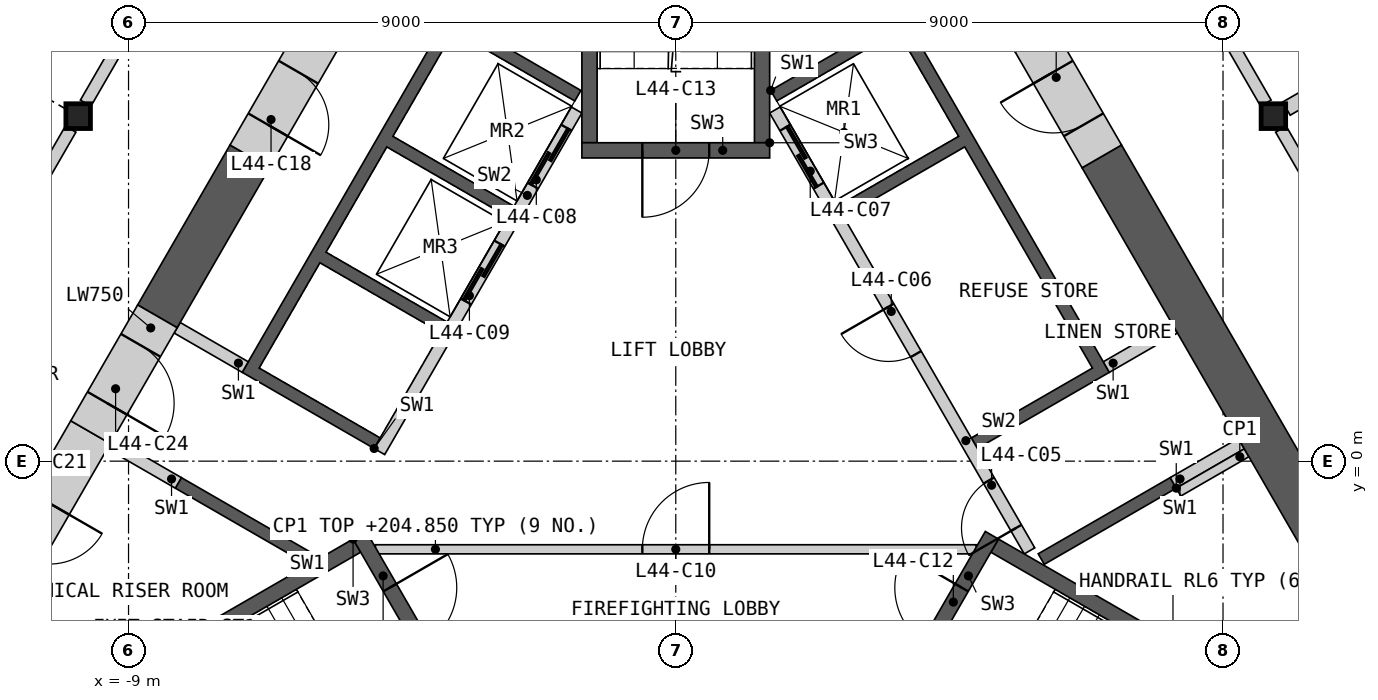
"""IFC4 building model, lengths in metres.
Left out: names, types, materials, properties, quantities, classifications, styles, units other than length and angle.
Written with IfcOpenShell. Run it as: python <this file> out.ifc"""

import sys

from ifc_helpers import new_model, si_unit, direction, frame, frame_2d, origin, origin_2d, place, context, subcontext, project, spatial, polyline, rectangle, i_section, outline, extrude, element, fill, save


model = new_model("IFC4")
c1 = context("Model", 3, precision=1e-05, world=origin(), true_north=direction((0.0, 1.0)))
c2 = subcontext(c1, "Body", "Model", "MODEL_VIEW")
j1 = project(units=[si_unit("LENGTHUNIT", "METRE"), si_unit("PLANEANGLEUNIT", "RADIAN")], contexts=[c1])
p1 = place(None, origin())
s1 = spatial("IfcSite", under=j1, at=p1, CompositionType="ELEMENT")
p2 = place(p1, origin())
s2 = spatial("IfcBuilding", under=s1, at=p2, CompositionType="ELEMENT")
p3 = place(p2, frame((0.0, 0.0, 201.6)))
s3 = spatial("IfcBuildingStorey", under=s2, at=p3, CompositionType="ELEMENT", Elevation=201.6)
for number, where, z_axis, x_axis in (
    (1, (-9.828, 5.675, 0.0), (0.0, 0.0, 1.0), (1.0, 0.0, 0.0)),
    (2, (9.828, 5.675, 0.0), (0.0, 0.0, 1.0), (1.0, 0.0, 0.0)),
):
    element("IfcColumn", number, at=place(p3, frame(where, z_axis=z_axis, x_axis=x_axis)), inside=s3, PredefinedType="COLUMN", context=c2, shape_type="SweptSolid", body=[
        extrude(i_section(OverallWidth=0.404, OverallDepth=0.407, WebThickness=0.027, FlangeThickness=0.044, at=origin_2d()), origin(), (0.0, 0.0, 1.0), 3.6),
    ])
p4 = place(p3, origin())
e3 = element("IfcWall", 3, at=p4, inside=s3, PredefinedType="SHEAR", context=c2, shape_type="SweptSolid", body=[
    extrude(outline(polyline([(1.561, 6.097), (3.731, 7.35), (7.131, 1.461), (4.96, 0.208), (4.861, 0.381), (6.852, 1.531), (4.752, 5.169), (2.76, 4.019), (2.66, 4.192), (4.652, 5.342), (3.652, 7.074), (1.66, 5.924), (1.561, 6.097)])), origin(), (0.0, 0.0, 1.0), 3.25),
])
p5 = place(p3, origin())
e4 = element("IfcWall", 4, at=p5, inside=s3, PredefinedType="SHEAR", context=c2, shape_type="SweptSolid", body=[
    extrude(outline(polyline([(8.231, -0.444), (6.061, -1.697), (5.96, -1.524), (8.131, -0.271), (8.231, -0.444)])), origin(), (0.0, 0.0, 1.0), 3.25),
])
p6 = place(p3, frame((5.817, -1.476, 0.0), z_axis=(0.0, 0.0, 1.0), x_axis=(-0.500002616675, 0.866023893041, 0.0)))
e5 = element("IfcWall", 5, at=p6, inside=s3, PredefinedType="SOLIDWALL", context=c2, shape_type="SweptSolid", body=[
    extrude(rectangle(XDim=8.373, YDim=0.2, at=frame_2d((4.187, 0.0))), origin(), (0.0, 0.0, 1.0), 3.25),
])
p7 = place(p6, frame((0.437, 0.0, 0.0)))
e6 = element("IfcOpeningElement", 6, at=p7, cuts=e5, PredefinedType="OPENING", context=c2, shape_type="SweptSolid", body=[
    extrude(rectangle(XDim=0.9, YDim=2.1, at=frame_2d((0.45, 1.05))), frame((0.0, 0.11, 0.0), z_axis=(0.0, -1.0, 0.0), x_axis=(1.0, 0.0, 0.0)), (0.0, 0.0, 1.0), 0.22),
])
p8 = place(p6, frame((3.737, 0.0, 0.0)))
e7 = element("IfcOpeningElement", 7, at=p8, cuts=e5, PredefinedType="OPENING", context=c2, shape_type="SweptSolid", body=[
    extrude(rectangle(XDim=0.9, YDim=2.1, at=frame_2d((0.45, 1.05))), frame((0.0, 0.11, 0.0), z_axis=(0.0, -1.0, 0.0), x_axis=(1.0, 0.0, 0.0)), (0.0, 0.0, 1.0), 0.22),
])
p9 = place(p6, frame((6.937, 0.0, 0.0)))
e8 = element("IfcOpeningElement", 8, at=p9, cuts=e5, PredefinedType="OPENING", context=c2, shape_type="SweptSolid", body=[
    extrude(rectangle(XDim=1.1, YDim=2.1, at=frame_2d((0.55, 1.05))), frame((0.0, 0.11, 0.0), z_axis=(0.0, -1.0, 0.0), x_axis=(1.0, 0.0, 0.0)), (0.0, 0.0, 1.0), 0.22),
])
for number, where, z_axis, x_axis in (
    (9, (8.181, -0.357, 0.0), (0.0, 0.0, 1.0), (0.866, 0.5, 0.0)),
    (10, (7.081, 1.548, 0.0), (0.0, 0.0, 1.0), (0.866, 0.5, 0.0)),
):
    element("IfcWall", number, at=place(p3, frame(where, z_axis=z_axis, x_axis=x_axis)), inside=s3, PredefinedType="SHEAR", context=c2, shape_type="SweptSolid", body=[
        extrude(rectangle(XDim=1.293, YDim=0.2, at=frame_2d((0.646, 0.0))), origin(), (0.0, 0.0, 1.0), 3.25),
    ])
p10 = place(p3, origin())
e11 = element("IfcWall", 11, at=p10, inside=s3, PredefinedType="SHEAR", context=c2, shape_type="SweptSolid", body=[
    extrude(outline(polyline([(-6.061, -1.697), (-8.231, -0.444), (-8.131, -0.271), (-5.96, -1.524), (-6.061, -1.697)])), origin(), (0.0, 0.0, 1.0), 3.25),
])
p11 = place(p3, origin())
e12 = element("IfcWall", 12, at=p11, inside=s3, PredefinedType="SHEAR", context=c2, shape_type="SweptSolid", body=[
    extrude(outline(polyline([(-4.96, 0.208), (-7.131, 1.461), (-3.731, 7.35), (-1.561, 6.097), (-1.66, 5.924), (-3.652, 7.074), (-4.652, 5.342), (-2.66, 4.192), (-2.76, 4.019), (-4.752, 5.169), (-5.752, 3.437), (-3.76, 2.287), (-3.861, 2.113), (-5.852, 3.263), (-6.852, 1.531), (-4.861, 0.381), (-4.96, 0.208)])), origin(), (0.0, 0.0, 1.0), 3.25),
])
p12 = place(p3, frame((-1.631, 5.776, 0.0), z_axis=(0.0, 0.0, 1.0), x_axis=(-0.499992876559, -0.866029516466, 0.0)))
e13 = element("IfcWall", 13, at=p12, inside=s3, PredefinedType="SOLIDWALL", context=c2, shape_type="SweptSolid", body=[
    extrude(rectangle(XDim=6.486, YDim=0.2, at=frame_2d((3.243, 0.0))), origin(), (0.0, 0.0, 1.0), 3.25),
])
p13 = place(p12, frame((0.337, 0.0, 0.0)))
e14 = element("IfcOpeningElement", 14, at=p13, cuts=e13, PredefinedType="OPENING", context=c2, shape_type="SweptSolid", body=[
    extrude(rectangle(XDim=1.1, YDim=2.1, at=frame_2d((0.55, 1.05))), frame((0.0, 0.11, 0.0), z_axis=(0.0, -1.0, 0.0), x_axis=(1.0, 0.0, 0.0)), (0.0, 0.0, 1.0), 0.22),
])
p14 = place(p12, frame((2.537, 0.0, 0.0)))
e15 = element("IfcOpeningElement", 15, at=p14, cuts=e13, PredefinedType="OPENING", context=c2, shape_type="SweptSolid", body=[
    extrude(rectangle(XDim=1.1, YDim=2.1, at=frame_2d((0.55, 1.05))), frame((0.0, 0.11, 0.0), z_axis=(0.0, -1.0, 0.0), x_axis=(1.0, 0.0, 0.0)), (0.0, 0.0, 1.0), 0.22),
])
for number, where, z_axis, x_axis in (
    (16, (-7.081, 1.548, 0.0), (0.0, 0.0, 1.0), (-0.866, 0.5, 0.0)),
    (17, (-8.181, -0.357, 0.0), (0.0, 0.0, 1.0), (-0.866, 0.5, 0.0)),
):
    element("IfcWall", number, at=place(p3, frame(where, z_axis=z_axis, x_axis=x_axis)), inside=s3, PredefinedType="SHEAR", context=c2, shape_type="SweptSolid", body=[
        extrude(rectangle(XDim=1.293, YDim=0.2, at=frame_2d((0.646, 0.0))), origin(), (0.0, 0.0, 1.0), 3.25),
    ])
p15 = place(p3, frame((-4.941, -1.45, 0.0), z_axis=(0.0, 0.0, 1.0), x_axis=(1.0, 0.0, 0.0)))
e18 = element("IfcWall", 18, at=p15, inside=s3, PredefinedType="PARTITIONING", context=c2, shape_type="SweptSolid", body=[
    extrude(rectangle(XDim=9.882, YDim=0.15, at=frame_2d((4.941, 0.0))), origin(), (0.0, 0.0, 1.0), 3.25),
])
p16 = place(p15, frame((4.391, 0.0, 0.0)))
e19 = element("IfcOpeningElement", 19, at=p16, cuts=e18, PredefinedType="OPENING", context=c2, shape_type="SweptSolid", body=[
    extrude(rectangle(XDim=1.1, YDim=2.1, at=frame_2d((0.55, 1.05))), frame((0.0, 0.085, 0.0), z_axis=(0.0, -1.0, 0.0), x_axis=(1.0, 0.0, 0.0)), (0.0, 0.0, 1.0), 0.17),
])
p17 = place(p3, origin())
e20 = element("IfcWall", 20, at=p17, inside=s3, PredefinedType="SHEAR", context=c2, shape_type="SweptSolid", body=[
    extrude(outline(polyline([(-5.307, -1.281), (-10.374, -4.206), (-10.032, -4.298), (-5.182, -1.498), (-5.307, -1.281)])), origin(), (0.0, 0.0, 1.0), 3.25),
])
p18 = place(p3, frame((-5.199, -1.219, 0.0), z_axis=(0.0, 0.0, 1.0), x_axis=(0.499982516597, -0.866035497597, 0.0)))
e21 = element("IfcWall", 21, at=p18, inside=s3, PredefinedType="SHEAR", context=c2, shape_type="SweptSolid", body=[
    extrude(rectangle(XDim=3.088, YDim=0.25, at=frame_2d((1.544, 0.0))), origin(), (0.0, 0.0, 1.0), 3.25),
])
p19 = place(p18, frame((0.994, 0.0, 0.0)))
e22 = element("IfcOpeningElement", 22, at=p19, cuts=e21, PredefinedType="OPENING", context=c2, shape_type="SweptSolid", body=[
    extrude(rectangle(XDim=1.1, YDim=2.1, at=frame_2d((0.55, 1.05))), frame((0.0, 0.135, 0.0), z_axis=(0.0, -1.0, 0.0), x_axis=(1.0, 0.0, 0.0)), (0.0, 0.0, 1.0), 0.27),
])
p20 = place(p3, origin())
e23 = element("IfcWall", 23, at=p20, inside=s3, PredefinedType="SHEAR", context=c2, shape_type="SweptSolid", body=[
    extrude(outline(polyline([(10.032, -4.298), (10.374, -4.206), (5.307, -1.281), (5.182, -1.498), (10.032, -4.298)])), origin(), (0.0, 0.0, 1.0), 3.25),
])
p21 = place(p3, frame((3.655, -3.893, 0.0), z_axis=(0.0, 0.0, 1.0), x_axis=(0.499982516597, 0.866035497597, 0.0)))
e24 = element("IfcWall", 24, at=p21, inside=s3, PredefinedType="SHEAR", context=c2, shape_type="SweptSolid", body=[
    extrude(rectangle(XDim=3.088, YDim=0.25, at=frame_2d((1.544, 0.0))), origin(), (0.0, 0.0, 1.0), 3.25),
])
p22 = place(p21, frame((0.994, 0.0, 0.0)))
e25 = element("IfcOpeningElement", 25, at=p22, cuts=e24, PredefinedType="OPENING", context=c2, shape_type="SweptSolid", body=[
    extrude(rectangle(XDim=1.1, YDim=2.1, at=frame_2d((0.55, 1.05))), frame((0.0, 0.135, 0.0), z_axis=(0.0, -1.0, 0.0), x_axis=(1.0, 0.0, 0.0)), (0.0, 0.0, 1.0), 0.27),
])
p23 = place(p3, origin())
e26 = element("IfcWall", 26, at=p23, inside=s3, PredefinedType="SHEAR", context=c2, shape_type="SweptSolid", body=[
    extrude(outline(polyline([(1.544, 5.237), (1.544, 11.087), (1.294, 10.837), (1.294, 5.237), (1.544, 5.237)])), origin(), (0.0, 0.0, 1.0), 3.25),
])
p24 = place(p3, origin())
e27 = element("IfcWall", 27, at=p24, inside=s3, PredefinedType="SHEAR", context=c2, shape_type="SweptSolid", body=[
    extrude(outline(polyline([(-1.294, 10.837), (-1.544, 11.087), (-1.544, 5.237), (-1.294, 5.237), (-1.294, 10.837)])), origin(), (0.0, 0.0, 1.0), 3.25),
])
p25 = place(p3, frame((1.544, 5.112, 0.0), z_axis=(0.0, 0.0, 1.0), x_axis=(-1.0, 0.0, 0.0)))
e28 = element("IfcWall", 28, at=p25, inside=s3, PredefinedType="SHEAR", context=c2, shape_type="SweptSolid", body=[
    extrude(rectangle(XDim=3.088, YDim=0.25, at=frame_2d((1.544, 0.0))), origin(), (0.0, 0.0, 1.0), 3.25),
])
p26 = place(p25, frame((0.994, 0.0, 0.0)))
e29 = element("IfcOpeningElement", 29, at=p26, cuts=e28, PredefinedType="OPENING", context=c2, shape_type="SweptSolid", body=[
    extrude(rectangle(XDim=1.1, YDim=2.1, at=frame_2d((0.55, 1.05))), frame((0.0, 0.135, 0.0), z_axis=(0.0, -1.0, 0.0), x_axis=(1.0, 0.0, 0.0)), (0.0, 0.0, 1.0), 0.27),
])
p27 = place(p3, frame((8.268, -0.509, 0.0), z_axis=(0.0, 0.0, 1.0), x_axis=(0.866003189247, 0.500038474733, 0.0)))
e30 = element("IfcWall", 30, at=p27, inside=s3, PredefinedType="PARTITIONING", context=c2, shape_type="SweptSolid", body=[
    extrude(rectangle(XDim=1.293, YDim=0.15, at=frame_2d((0.646, 0.0))), origin(), (0.0, 0.0, 1.0), 3.25),
])
p28 = place(p3, frame((14.526, -8.011, 0.0), z_axis=(0.0, 0.0, 1.0), x_axis=(-0.499996012963, 0.866027705689, 0.0)))
e31 = element("IfcWall", 31, at=p28, inside=s3, PredefinedType="SHEAR", context=c2, shape_type="SweptSolid", body=[
    extrude(rectangle(XDim=15.039, YDim=0.75, at=frame_2d((7.519, 0.0))), origin(), (0.0, 0.0, 1.0), 3.25),
])
p29 = place(p3, frame((-7.006, 5.012, 0.0), z_axis=(0.0, 0.0, 1.0), x_axis=(-0.49996826437, -0.866043725583, 0.0)))
e32 = element("IfcWall", 32, at=p29, inside=s3, PredefinedType="SHEAR", context=c2, shape_type="SweptSolid", body=[
    extrude(rectangle(XDim=3.038, YDim=0.75, at=frame_2d((1.519, 0.0))), origin(), (0.0, 0.0, 1.0), 3.25),
])
p30 = place(p3, frame((-5.906, 6.918, 0.0), z_axis=(0.0, 0.0, 1.0), x_axis=(-0.499946605688, -0.86605622881, 0.0)))
e33 = element("IfcWall", 33, at=p30, inside=s3, PredefinedType="SHEAR", context=c2, shape_type="SweptSolid", body=[
    extrude(rectangle(XDim=2.2, YDim=0.75, at=frame_2d((1.1, 0.0))), origin(), (0.0, 0.0, 1.0), 3.25),
])
p31 = place(p30, frame((0.6, 0.0, 0.0)))
e34 = element("IfcOpeningElement", 34, at=p31, cuts=e33, PredefinedType="OPENING", context=c2, shape_type="SweptSolid", body=[
    extrude(rectangle(XDim=1.0, YDim=2.1, at=frame_2d((0.5, 1.05))), frame((0.0, 0.385, 0.0), z_axis=(0.0, -1.0, 0.0), x_axis=(1.0, 0.0, 0.0)), (0.0, 0.0, 1.0), 0.77),
])
p32 = place(p3, frame((7.006, 5.012, 0.0), z_axis=(0.0, 0.0, 1.0), x_axis=(-0.499946605688, 0.86605622881, 0.0)))
e35 = element("IfcWall", 35, at=p32, inside=s3, PredefinedType="SHEAR", context=c2, shape_type="SweptSolid", body=[
    extrude(rectangle(XDim=2.2, YDim=0.75, at=frame_2d((1.1, 0.0))), origin(), (0.0, 0.0, 1.0), 3.25),
])
p33 = place(p32, frame((0.6, 0.0, 0.0)))
e36 = element("IfcOpeningElement", 36, at=p33, cuts=e35, PredefinedType="OPENING", context=c2, shape_type="SweptSolid", body=[
    extrude(rectangle(XDim=1.0, YDim=2.1, at=frame_2d((0.5, 1.05))), frame((0.0, 0.385, 0.0), z_axis=(0.0, -1.0, 0.0), x_axis=(1.0, 0.0, 0.0)), (0.0, 0.0, 1.0), 0.77),
])
p34 = place(p3, frame((-9.625, 0.477, 0.0), z_axis=(0.0, 0.0, 1.0), x_axis=(-0.500005104963, -0.866022456413, 0.0)))
e37 = element("IfcWall", 37, at=p34, inside=s3, PredefinedType="SHEAR", context=c2, shape_type="SweptSolid", body=[
    extrude(rectangle(XDim=2.941, YDim=0.75, at=frame_2d((1.47, 0.0))), origin(), (0.0, 0.0, 1.0), 3.25),
])
p35 = place(p34, frame((1.35, 0.0, 0.0)))
e38 = element("IfcOpeningElement", 38, at=p35, cuts=e37, PredefinedType="OPENING", context=c2, shape_type="SweptSolid", body=[
    extrude(rectangle(XDim=1.0, YDim=2.1, at=frame_2d((0.5, 1.05))), frame((0.0, 0.385, 0.0), z_axis=(0.0, -1.0, 0.0), x_axis=(1.0, 0.0, 0.0)), (0.0, 0.0, 1.0), 0.77),
])
p36 = place(p3, frame((-8.525, 2.382, 0.0), z_axis=(0.0, 0.0, 1.0), x_axis=(-0.500077893725, -0.86598042715, 0.0)))
e39 = element("IfcWall", 39, at=p36, inside=s3, PredefinedType="SHEAR", context=c2, shape_type="SweptSolid", body=[
    extrude(rectangle(XDim=2.2, YDim=0.75, at=frame_2d((1.1, 0.0))), origin(), (0.0, 0.0, 1.0), 3.25),
])
p37 = place(p36, frame((0.55, 0.0, 0.0)))
e40 = element("IfcOpeningElement", 40, at=p37, cuts=e39, PredefinedType="OPENING", context=c2, shape_type="SweptSolid", body=[
    extrude(rectangle(XDim=1.1, YDim=2.1, at=frame_2d((0.55, 1.05))), frame((0.0, 0.385, 0.0), z_axis=(0.0, -1.0, 0.0), x_axis=(1.0, 0.0, 0.0)), (0.0, 0.0, 1.0), 0.77),
])
p38 = place(p3, frame((10.042, 5.798, 0.0), z_axis=(0.0, 0.0, 1.0), x_axis=(0.866025883649, 0.499999168849, 0.0)))
e41 = element("IfcWall", 41, at=p38, inside=s3, PredefinedType="PARTITIONING", context=c2, shape_type="SweptSolid", body=[
    extrude(rectangle(XDim=12.652, YDim=0.25, at=frame_2d((6.326, 0.0))), origin(), (0.0, 0.0, 1.0), 2.404),
])
p39 = place(p3, frame((5.038, 13.972, 0.0), z_axis=(0.0, 0.0, 1.0), x_axis=(0.50000393355, -0.866023132736, 0.0)))
e42 = element("IfcWall", 42, at=p39, inside=s3, PredefinedType="PARTITIONING", context=c2, shape_type="SweptSolid", body=[
    extrude(rectangle(XDim=9.335, YDim=0.2, at=frame_2d((4.667, 0.0))), origin(), (0.0, 0.0, 1.0), 3.25),
])
p40 = place(p39, frame((4.77, 0.0, 0.0)))
e43 = element("IfcOpeningElement", 43, at=p40, cuts=e42, PredefinedType="OPENING", context=c2, shape_type="SweptSolid", body=[
    extrude(rectangle(XDim=1.0, YDim=2.1, at=frame_2d((0.5, 1.05))), frame((0.0, 0.11, 0.0), z_axis=(0.0, -1.0, 0.0), x_axis=(1.0, 0.0, 0.0)), (0.0, 0.0, 1.0), 0.22),
])
p41 = place(p39, frame((3.163, 0.0, 0.0)))
e44 = element("IfcOpeningElement", 44, at=p41, cuts=e42, PredefinedType="OPENING", context=c2, shape_type="SweptSolid", body=[
    extrude(rectangle(XDim=1.0, YDim=2.1, at=frame_2d((0.5, 1.05))), frame((0.0, 0.11, 0.0), z_axis=(0.0, -1.0, 0.0), x_axis=(1.0, 0.0, 0.0)), (0.0, 0.0, 1.0), 0.22),
])
p42 = place(p3, frame((-9.705, 5.888, 0.0), z_axis=(0.0, 0.0, 1.0), x_axis=(0.50000393355, 0.866023132736, 0.0)))
e45 = element("IfcWall", 45, at=p42, inside=s3, PredefinedType="PARTITIONING", context=c2, shape_type="SweptSolid", body=[
    extrude(rectangle(XDim=9.335, YDim=0.2, at=frame_2d((4.667, 0.0))), origin(), (0.0, 0.0, 1.0), 3.25),
])
p43 = place(p42, frame((1.556, 0.0, 0.0)))
e46 = element("IfcOpeningElement", 46, at=p43, cuts=e45, PredefinedType="OPENING", context=c2, shape_type="SweptSolid", body=[
    extrude(rectangle(XDim=1.8, YDim=2.1, at=frame_2d((0.9, 1.05))), frame((0.0, 0.11, 0.0), z_axis=(0.0, -1.0, 0.0), x_axis=(1.0, 0.0, 0.0)), (0.0, 0.0, 1.0), 0.22),
])
p44 = place(p3, frame((9.952, 5.461, 0.0), z_axis=(0.0, 0.0, 1.0), x_axis=(0.50000393355, -0.866023132736, 0.0)))
e47 = element("IfcWall", 47, at=p44, inside=s3, PredefinedType="PARTITIONING", context=c2, shape_type="SweptSolid", body=[
    extrude(rectangle(XDim=9.335, YDim=0.2, at=frame_2d((4.667, 0.0))), origin(), (0.0, 0.0, 1.0), 3.25),
])
p45 = place(p44, frame((5.172, 0.0, 0.0)))
e48 = element("IfcOpeningElement", 48, at=p45, cuts=e47, PredefinedType="OPENING", context=c2, shape_type="SweptSolid", body=[
    extrude(rectangle(XDim=1.0, YDim=2.1, at=frame_2d((0.5, 1.05))), frame((0.0, 0.11, 0.0), z_axis=(0.0, -1.0, 0.0), x_axis=(1.0, 0.0, 0.0)), (0.0, 0.0, 1.0), 0.22),
])
p46 = place(p44, frame((3.565, 0.0, 0.0)))
e49 = element("IfcOpeningElement", 49, at=p46, cuts=e47, PredefinedType="OPENING", context=c2, shape_type="SweptSolid", body=[
    extrude(rectangle(XDim=1.0, YDim=2.1, at=frame_2d((0.5, 1.05))), frame((0.0, 0.11, 0.0), z_axis=(0.0, -1.0, 0.0), x_axis=(1.0, 0.0, 0.0)), (0.0, 0.0, 1.0), 0.22),
])
p47 = place(p3, frame((-14.619, -2.624, 0.0), z_axis=(0.0, 0.0, 1.0), x_axis=(0.50000393355, 0.866023132736, 0.0)))
e50 = element("IfcWall", 50, at=p47, inside=s3, PredefinedType="PARTITIONING", context=c2, shape_type="SweptSolid", body=[
    extrude(rectangle(XDim=9.335, YDim=0.2, at=frame_2d((4.667, 0.0))), origin(), (0.0, 0.0, 1.0), 3.25),
])
p48 = place(p47, frame((3.163, 0.0, 0.0)))
e51 = element("IfcOpeningElement", 51, at=p48, cuts=e50, PredefinedType="OPENING", context=c2, shape_type="SweptSolid", body=[
    extrude(rectangle(XDim=1.0, YDim=2.1, at=frame_2d((0.5, 1.05))), frame((0.0, 0.11, 0.0), z_axis=(0.0, -1.0, 0.0), x_axis=(1.0, 0.0, 0.0)), (0.0, 0.0, 1.0), 0.22),
])
p49 = place(p7, origin())
e52 = element("IfcDoor", 52, at=p49, inside=s3, OperationType="SINGLE_SWING_LEFT", PredefinedType="DOOR", context=c2, shape_type="SweptSolid", body=[
    extrude(rectangle(XDim=0.9, YDim=2.1, at=frame_2d((0.45, 1.05))), frame((0.0, 0.025, 0.0), z_axis=(0.0, -1.0, 0.0), x_axis=(1.0, 0.0, 0.0)), (0.0, 0.0, 1.0), 0.05),
])
fill(e6, e52)
p50 = place(p8, origin())
e53 = element("IfcDoor", 53, at=p50, inside=s3, OperationType="SINGLE_SWING_RIGHT", PredefinedType="DOOR", context=c2, shape_type="SweptSolid", body=[
    extrude(rectangle(XDim=0.9, YDim=2.1, at=frame_2d((0.45, 1.05))), frame((0.0, 0.025, 0.0), z_axis=(0.0, -1.0, 0.0), x_axis=(1.0, 0.0, 0.0)), (0.0, 0.0, 1.0), 0.05),
])
fill(e7, e53)
p51 = place(p9, origin())
e54 = element("IfcDoor", 54, at=p51, inside=s3, OperationType="SLIDING_TO_LEFT", PredefinedType="DOOR", context=c2, shape_type="SweptSolid", body=[
    extrude(rectangle(XDim=1.1, YDim=2.1, at=frame_2d((0.55, 1.05))), frame((0.0, 0.025, 0.0), z_axis=(0.0, -1.0, 0.0), x_axis=(1.0, 0.0, 0.0)), (0.0, 0.0, 1.0), 0.05),
])
fill(e8, e54)
p52 = place(p13, origin())
e55 = element("IfcDoor", 55, at=p52, inside=s3, OperationType="SLIDING_TO_LEFT", PredefinedType="DOOR", context=c2, shape_type="SweptSolid", body=[
    extrude(rectangle(XDim=1.1, YDim=2.1, at=frame_2d((0.55, 1.05))), frame((0.0, 0.025, 0.0), z_axis=(0.0, -1.0, 0.0), x_axis=(1.0, 0.0, 0.0)), (0.0, 0.0, 1.0), 0.05),
])
fill(e14, e55)
p53 = place(p14, origin())
e56 = element("IfcDoor", 56, at=p53, inside=s3, OperationType="SLIDING_TO_LEFT", PredefinedType="DOOR", context=c2, shape_type="SweptSolid", body=[
    extrude(rectangle(XDim=1.1, YDim=2.1, at=frame_2d((0.55, 1.05))), frame((0.0, 0.025, 0.0), z_axis=(0.0, -1.0, 0.0), x_axis=(1.0, 0.0, 0.0)), (0.0, 0.0, 1.0), 0.05),
])
fill(e15, e56)
p54 = place(p16, origin())
e57 = element("IfcDoor", 57, at=p54, inside=s3, OperationType="SINGLE_SWING_RIGHT", PredefinedType="DOOR", context=c2, shape_type="SweptSolid", body=[
    extrude(rectangle(XDim=1.1, YDim=2.1, at=frame_2d((0.55, 1.05))), frame((0.0, 0.025, 0.0), z_axis=(0.0, -1.0, 0.0), x_axis=(1.0, 0.0, 0.0)), (0.0, 0.0, 1.0), 0.05),
])
fill(e19, e57)
p55 = place(p19, origin())
e58 = element("IfcDoor", 58, at=p55, inside=s3, OperationType="SINGLE_SWING_LEFT", PredefinedType="DOOR", context=c2, shape_type="SweptSolid", body=[
    extrude(rectangle(XDim=1.1, YDim=2.1, at=frame_2d((0.55, 1.05))), frame((0.0, 0.025, 0.0), z_axis=(0.0, -1.0, 0.0), x_axis=(1.0, 0.0, 0.0)), (0.0, 0.0, 1.0), 0.05),
])
fill(e22, e58)
p56 = place(p22, origin())
e59 = element("IfcDoor", 59, at=p56, inside=s3, OperationType="SINGLE_SWING_RIGHT", PredefinedType="DOOR", context=c2, shape_type="SweptSolid", body=[
    extrude(rectangle(XDim=1.1, YDim=2.1, at=frame_2d((0.55, 1.05))), frame((0.0, 0.025, 0.0), z_axis=(0.0, -1.0, 0.0), x_axis=(1.0, 0.0, 0.0)), (0.0, 0.0, 1.0), 0.05),
])
fill(e25, e59)
p57 = place(p26, origin())
e60 = element("IfcDoor", 60, at=p57, inside=s3, OperationType="SINGLE_SWING_RIGHT", PredefinedType="DOOR", context=c2, shape_type="SweptSolid", body=[
    extrude(rectangle(XDim=1.1, YDim=2.1, at=frame_2d((0.55, 1.05))), frame((0.0, 0.025, 0.0), z_axis=(0.0, -1.0, 0.0), x_axis=(1.0, 0.0, 0.0)), (0.0, 0.0, 1.0), 0.05),
])
fill(e29, e60)
p58 = place(p31, origin())
e61 = element("IfcDoor", 61, at=p58, inside=s3, OperationType="SINGLE_SWING_RIGHT", PredefinedType="DOOR", context=c2, shape_type="SweptSolid", body=[
    extrude(rectangle(XDim=1.0, YDim=2.1, at=frame_2d((0.5, 1.05))), frame((0.0, 0.13, 0.0), z_axis=(0.0, -1.0, 0.0), x_axis=(1.0, 0.0, 0.0)), (0.0, 0.0, 1.0), 0.05),
])
fill(e34, e61)
p59 = place(p33, origin())
e62 = element("IfcDoor", 62, at=p59, inside=s3, OperationType="SINGLE_SWING_RIGHT", PredefinedType="DOOR", context=c2, shape_type="SweptSolid", body=[
    extrude(rectangle(XDim=1.0, YDim=2.1, at=frame_2d((0.5, 1.05))), frame((0.0, 0.13, 0.0), z_axis=(0.0, -1.0, 0.0), x_axis=(1.0, 0.0, 0.0)), (0.0, 0.0, 1.0), 0.05),
])
fill(e36, e62)
p60 = place(p35, origin())
e63 = element("IfcDoor", 63, at=p60, inside=s3, OperationType="SINGLE_SWING_LEFT", PredefinedType="DOOR", context=c2, shape_type="SweptSolid", body=[
    extrude(rectangle(XDim=1.0, YDim=2.1, at=frame_2d((0.5, 1.05))), frame((0.0, 0.13, 0.0), z_axis=(0.0, -1.0, 0.0), x_axis=(1.0, 0.0, 0.0)), (0.0, 0.0, 1.0), 0.05),
])
fill(e38, e63)
p61 = place(p37, origin())
e64 = element("IfcDoor", 64, at=p61, inside=s3, OperationType="SINGLE_SWING_RIGHT", PredefinedType="DOOR", context=c2, shape_type="SweptSolid", body=[
    extrude(rectangle(XDim=1.1, YDim=2.1, at=frame_2d((0.55, 1.05))), frame((0.0, 0.13, 0.0), z_axis=(0.0, -1.0, 0.0), x_axis=(1.0, 0.0, 0.0)), (0.0, 0.0, 1.0), 0.05),
])
fill(e40, e64)
save(model, sys.argv[1])
